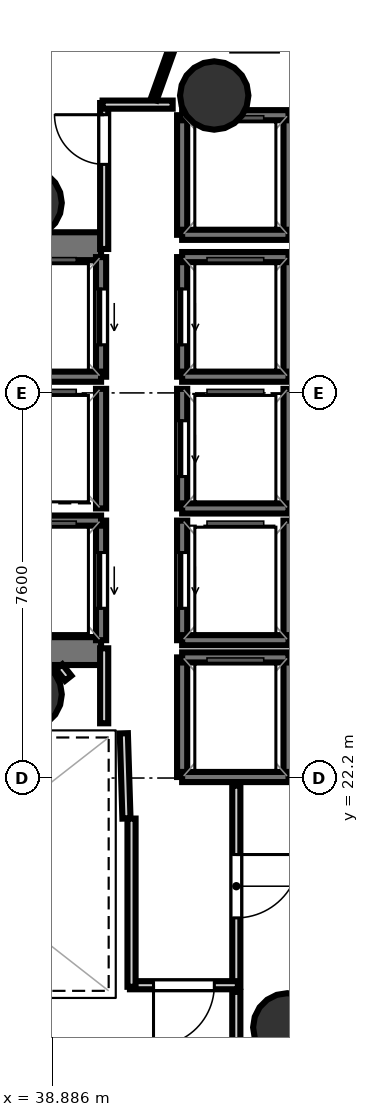
"""IFC4 building model, lengths in metres.
Left out: names, types, materials, properties, quantities, classifications, styles, units other than length and angle.
Written with IfcOpenShell. Run it as: python <this file> out.ifc"""

import sys

from ifc_helpers import new_model, si_unit, direction, frame, frame_2d, origin, origin_2d, place, context, subcontext, project, spatial, rectangle, hollow_circle, extrude, element, fill, save


model = new_model("IFC4")
c1 = context("Model", 3, precision=1e-05, world=origin(), true_north=direction((0.0, 1.0)))
c2 = subcontext(c1, "Body", "Model", "MODEL_VIEW")
j1 = project(units=[si_unit("LENGTHUNIT", "METRE"), si_unit("PLANEANGLEUNIT", "RADIAN")], contexts=[c1])
p1 = place(None, origin())
s1 = spatial("IfcSite", under=j1, at=p1, CompositionType="ELEMENT")
p2 = place(p1, origin())
s2 = spatial("IfcBuilding", under=s1, at=p2, CompositionType="ELEMENT")
p3 = place(p2, frame((0.0, 0.0, 151.3)))
s3 = spatial("IfcBuildingStorey", under=s2, at=p3, CompositionType="ELEMENT", Elevation=151.3)
p4 = place(p3, frame((29.23, 32.695, 0.0), z_axis=(0.0, 0.0, 1.0), x_axis=(1.0, 0.0, 0.0)))
e1 = element("IfcWall", 1, at=p4, inside=s3, PredefinedType="SHEAR", context=c2, shape_type="SweptSolid", body=[
    extrude(rectangle(XDim=10.62, YDim=0.55, at=frame_2d((5.31, 0.0))), origin(), (0.0, 0.0, 1.0), 3.52),
])
p5 = place(p4, frame((0.995, 0.0, 0.0)))
e2 = element("IfcOpeningElement", 2, at=p5, cuts=e1, PredefinedType="OPENING", context=c2, shape_type="SweptSolid", body=[
    extrude(rectangle(XDim=1.25, YDim=2.15, at=frame_2d((0.625, 1.075))), frame((0.0, 0.285, 0.0), z_axis=(0.0, -1.0, 0.0), x_axis=(1.0, 0.0, 0.0)), (0.0, 0.0, 1.0), 0.57),
])
p6 = place(p3, frame((29.23, 24.705, 0.0), z_axis=(0.0, 0.0, 1.0), x_axis=(1.0, 0.0, 0.0)))
e3 = element("IfcWall", 3, at=p6, inside=s3, PredefinedType="SHEAR", context=c2, shape_type="SweptSolid", body=[
    extrude(rectangle(XDim=10.62, YDim=0.55, at=frame_2d((5.31, 0.0))), origin(), (0.0, 0.0, 1.0), 3.52),
])
p7 = place(p6, frame((0.795, 0.0, 0.0)))
e4 = element("IfcOpeningElement", 4, at=p7, cuts=e3, PredefinedType="OPENING", context=c2, shape_type="SweptSolid", body=[
    extrude(rectangle(XDim=1.25, YDim=2.15, at=frame_2d((0.625, 1.075))), frame((0.0, 0.285, 0.0), z_axis=(0.0, -1.0, 0.0), x_axis=(1.0, 0.0, 0.0)), (0.0, 0.0, 1.0), 0.57),
])
for number, where, z_axis, x_axis in (
    (5, (38.4, 33.55, 0.0), (0.0, 0.0, 1.0), (1.0, 0.0, 0.0)),
    (6, (38.4, 23.85, 0.0), (0.0, 0.0, 1.0), (1.0, 0.0, 0.0)),
    (7, (42.083, 35.669, 0.0), (0.0, 0.0, 1.0), (1.0, 0.0, 0.0)),
    (8, (43.525, 17.279, 0.0), (0.0, 0.0, 1.0), (1.0, 0.0, 0.0)),
):
    element("IfcColumn", number, at=place(p3, frame(where, z_axis=z_axis, x_axis=x_axis)), inside=s3, PredefinedType="COLUMN", context=c2, shape_type="SweptSolid", body=[
        extrude(hollow_circle(Radius=0.675, WallThickness=0.032, at=origin_2d()), origin(), (0.0, 0.0, 1.0), 3.7),
    ])
p8 = place(p3, frame((39.85, 30.12, 0.0), z_axis=(0.0, 0.0, 1.0), x_axis=(0.0, 1.0, 0.0)))
e9 = element("IfcWall", 9, at=p8, inside=s3, PredefinedType="SOLIDWALL", context=c2, shape_type="SweptSolid", body=[
    extrude(rectangle(XDim=2.36, YDim=0.2, at=frame_2d((1.18, 0.0))), origin(), (0.0, 0.0, 1.0), 3.52),
])
p9 = place(p8, frame((0.63, 0.0, 0.0)))
e10 = element("IfcOpeningElement", 10, at=p9, cuts=e9, PredefinedType="OPENING", context=c2, shape_type="SweptSolid", body=[
    extrude(rectangle(XDim=1.1, YDim=2.15, at=frame_2d((0.55, 1.075))), frame((0.0, 0.11, 0.0), z_axis=(0.0, -1.0, 0.0), x_axis=(1.0, 0.0, 0.0)), (0.0, 0.0, 1.0), 0.22),
])
p10 = place(p3, frame((37.75, 30.12, 0.0), z_axis=(0.0, 0.0, 1.0), x_axis=(1.0, 0.0, 0.0)))
e11 = element("IfcWall", 11, at=p10, inside=s3, PredefinedType="SOLIDWALL", context=c2, shape_type="SweptSolid", body=[
    extrude(rectangle(XDim=2.1, YDim=0.2, at=frame_2d((1.05, 0.0))), origin(), (0.0, 0.0, 1.0), 3.52),
])
p11 = place(p3, frame((39.85, 24.92, 0.0), z_axis=(0.0, 0.0, 1.0), x_axis=(0.0, 1.0, 0.0)))
e12 = element("IfcWall", 12, at=p11, inside=s3, PredefinedType="SOLIDWALL", context=c2, shape_type="SweptSolid", body=[
    extrude(rectangle(XDim=2.36, YDim=0.2, at=frame_2d((1.18, 0.0))), origin(), (0.0, 0.0, 1.0), 3.52),
])
p12 = place(p11, frame((0.63, 0.0, 0.0)))
e13 = element("IfcOpeningElement", 13, at=p12, cuts=e12, PredefinedType="OPENING", context=c2, shape_type="SweptSolid", body=[
    extrude(rectangle(XDim=1.1, YDim=2.15, at=frame_2d((0.55, 1.075))), frame((0.0, 0.11, 0.0), z_axis=(0.0, -1.0, 0.0), x_axis=(1.0, 0.0, 0.0)), (0.0, 0.0, 1.0), 0.22),
])
p13 = place(p3, frame((37.75, 27.28, 0.0), z_axis=(0.0, 0.0, 1.0), x_axis=(1.0, 0.0, 0.0)))
e14 = element("IfcWall", 14, at=p13, inside=s3, PredefinedType="SOLIDWALL", context=c2, shape_type="SweptSolid", body=[
    extrude(rectangle(XDim=2.1, YDim=0.2, at=frame_2d((1.05, 0.0))), origin(), (0.0, 0.0, 1.0), 3.52),
])
p14 = place(p3, frame((43.55, 30.12, 0.0), z_axis=(0.0, 0.0, 1.0), x_axis=(0.0, 1.0, 0.0)))
e15 = element("IfcWall", 15, at=p14, inside=s3, PredefinedType="SOLIDWALL", context=c2, shape_type="SweptSolid", body=[
    extrude(rectangle(XDim=2.36, YDim=0.2, at=frame_2d((1.18, 0.0))), origin(), (0.0, 0.0, 1.0), 3.52),
])
p15 = place(p3, frame((41.45, 30.12, 0.0), z_axis=(0.0, 0.0, 1.0), x_axis=(0.0, 1.0, 0.0)))
e16 = element("IfcWall", 16, at=p15, inside=s3, PredefinedType="SOLIDWALL", context=c2, shape_type="SweptSolid", body=[
    extrude(rectangle(XDim=2.36, YDim=0.2, at=frame_2d((1.18, 0.0))), origin(), (0.0, 0.0, 1.0), 3.52),
])
p16 = place(p15, frame((0.63, 0.0, 0.0)))
e17 = element("IfcOpeningElement", 17, at=p16, cuts=e16, PredefinedType="OPENING", context=c2, shape_type="SweptSolid", body=[
    extrude(rectangle(XDim=1.1, YDim=2.15, at=frame_2d((0.55, 1.075))), frame((0.0, 0.11, 0.0), z_axis=(0.0, -1.0, 0.0), x_axis=(1.0, 0.0, 0.0)), (0.0, 0.0, 1.0), 0.22),
])
for number, where, z_axis, x_axis in (
    (18, (41.45, 32.48, 0.0), (0.0, 0.0, 1.0), (1.0, 0.0, 0.0)),
    (19, (41.45, 30.12, 0.0), (0.0, 0.0, 1.0), (1.0, 0.0, 0.0)),
):
    element("IfcWall", number, at=place(p3, frame(where, z_axis=z_axis, x_axis=x_axis)), inside=s3, PredefinedType="SOLIDWALL", context=c2, shape_type="SweptSolid", body=[
        extrude(rectangle(XDim=2.1, YDim=0.2, at=frame_2d((1.05, 0.0))), origin(), (0.0, 0.0, 1.0), 3.52),
    ])
p17 = place(p3, frame((43.55, 27.52, 0.0), z_axis=(0.0, 0.0, 1.0), x_axis=(0.0, 1.0, 0.0)))
e20 = element("IfcWall", 20, at=p17, inside=s3, PredefinedType="SOLIDWALL", context=c2, shape_type="SweptSolid", body=[
    extrude(rectangle(XDim=2.36, YDim=0.2, at=frame_2d((1.18, 0.0))), origin(), (0.0, 0.0, 1.0), 3.52),
])
p18 = place(p3, frame((41.45, 27.52, 0.0), z_axis=(0.0, 0.0, 1.0), x_axis=(0.0, 1.0, 0.0)))
e21 = element("IfcWall", 21, at=p18, inside=s3, PredefinedType="SOLIDWALL", context=c2, shape_type="SweptSolid", body=[
    extrude(rectangle(XDim=2.36, YDim=0.2, at=frame_2d((1.18, 0.0))), origin(), (0.0, 0.0, 1.0), 3.52),
])
p19 = place(p18, frame((0.63, 0.0, 0.0)))
e22 = element("IfcOpeningElement", 22, at=p19, cuts=e21, PredefinedType="OPENING", context=c2, shape_type="SweptSolid", body=[
    extrude(rectangle(XDim=1.1, YDim=2.15, at=frame_2d((0.55, 1.075))), frame((0.0, 0.11, 0.0), z_axis=(0.0, -1.0, 0.0), x_axis=(1.0, 0.0, 0.0)), (0.0, 0.0, 1.0), 0.22),
])
p20 = place(p3, frame((41.45, 27.52, 0.0), z_axis=(0.0, 0.0, 1.0), x_axis=(1.0, 0.0, 0.0)))
e23 = element("IfcWall", 23, at=p20, inside=s3, PredefinedType="SOLIDWALL", context=c2, shape_type="SweptSolid", body=[
    extrude(rectangle(XDim=2.1, YDim=0.2, at=frame_2d((1.05, 0.0))), origin(), (0.0, 0.0, 1.0), 3.52),
])
p21 = place(p3, frame((43.55, 24.92, 0.0), z_axis=(0.0, 0.0, 1.0), x_axis=(0.0, 1.0, 0.0)))
e24 = element("IfcWall", 24, at=p21, inside=s3, PredefinedType="SOLIDWALL", context=c2, shape_type="SweptSolid", body=[
    extrude(rectangle(XDim=2.36, YDim=0.2, at=frame_2d((1.18, 0.0))), origin(), (0.0, 0.0, 1.0), 3.52),
])
p22 = place(p3, frame((41.45, 24.92, 0.0), z_axis=(0.0, 0.0, 1.0), x_axis=(0.0, 1.0, 0.0)))
e25 = element("IfcWall", 25, at=p22, inside=s3, PredefinedType="SOLIDWALL", context=c2, shape_type="SweptSolid", body=[
    extrude(rectangle(XDim=2.36, YDim=0.2, at=frame_2d((1.18, 0.0))), origin(), (0.0, 0.0, 1.0), 3.52),
])
p23 = place(p22, frame((0.63, 0.0, 0.0)))
e26 = element("IfcOpeningElement", 26, at=p23, cuts=e25, PredefinedType="OPENING", context=c2, shape_type="SweptSolid", body=[
    extrude(rectangle(XDim=1.1, YDim=2.15, at=frame_2d((0.55, 1.075))), frame((0.0, 0.11, 0.0), z_axis=(0.0, -1.0, 0.0), x_axis=(1.0, 0.0, 0.0)), (0.0, 0.0, 1.0), 0.22),
])
p24 = place(p3, frame((41.45, 24.92, 0.0), z_axis=(0.0, 0.0, 1.0), x_axis=(1.0, 0.0, 0.0)))
e27 = element("IfcWall", 27, at=p24, inside=s3, PredefinedType="SOLIDWALL", context=c2, shape_type="SweptSolid", body=[
    extrude(rectangle(XDim=2.1, YDim=0.2, at=frame_2d((1.05, 0.0))), origin(), (0.0, 0.0, 1.0), 3.52),
])
p25 = place(p3, frame((39.85, 27.52, 0.0), z_axis=(0.0, 0.0, 1.0), x_axis=(0.0, 1.0, 0.0)))
e28 = element("IfcWall", 28, at=p25, inside=s3, PredefinedType="SOLIDWALL", context=c2, shape_type="SweptSolid", body=[
    extrude(rectangle(XDim=2.36, YDim=0.2, at=frame_2d((1.18, 0.0))), origin(), (0.0, 0.0, 1.0), 3.52),
])
for number, where, z_axis, x_axis in (
    (29, (43.55, 22.22, 0.0), (0.0, 0.0, 1.0), (0.0, 1.0, 0.0)),
    (30, (41.45, 22.22, 0.0), (0.0, 0.0, 1.0), (0.0, 1.0, 0.0)),
):
    element("IfcWall", number, at=place(p3, frame(where, z_axis=z_axis, x_axis=x_axis)), inside=s3, PredefinedType="SOLIDWALL", context=c2, shape_type="SweptSolid", body=[
        extrude(rectangle(XDim=2.36, YDim=0.2, at=frame_2d((1.18, 0.0))), origin(), (0.0, 0.0, 1.0), 3.52),
    ])
for number, where, z_axis, x_axis in (
    (31, (41.45, 24.58, 0.0), (0.0, 0.0, 1.0), (1.0, 0.0, 0.0)),
    (32, (41.45, 22.22, 0.0), (0.0, 0.0, 1.0), (1.0, 0.0, 0.0)),
):
    element("IfcWall", number, at=place(p3, frame(where, z_axis=z_axis, x_axis=x_axis)), inside=s3, PredefinedType="SOLIDWALL", context=c2, shape_type="SweptSolid", body=[
        extrude(rectangle(XDim=2.1, YDim=0.2, at=frame_2d((1.05, 0.0))), origin(), (0.0, 0.0, 1.0), 3.52),
    ])
for number, where, z_axis, x_axis in (
    (33, (43.55, 32.92, 0.0), (0.0, 0.0, 1.0), (0.0, 1.0, 0.0)),
    (34, (41.45, 32.92, 0.0), (0.0, 0.0, 1.0), (0.0, 1.0, 0.0)),
):
    element("IfcWall", number, at=place(p3, frame(where, z_axis=z_axis, x_axis=x_axis)), inside=s3, PredefinedType="SOLIDWALL", context=c2, shape_type="SweptSolid", body=[
        extrude(rectangle(XDim=2.36, YDim=0.2, at=frame_2d((1.18, 0.0))), origin(), (0.0, 0.0, 1.0), 3.52),
    ])
for number, where, z_axis, x_axis in (
    (35, (41.45, 35.28, 0.0), (0.0, 0.0, 1.0), (1.0, 0.0, 0.0)),
    (36, (41.45, 32.92, 0.0), (0.0, 0.0, 1.0), (1.0, 0.0, 0.0)),
):
    element("IfcWall", number, at=place(p3, frame(where, z_axis=z_axis, x_axis=x_axis)), inside=s3, PredefinedType="SOLIDWALL", context=c2, shape_type="SweptSolid", body=[
        extrude(rectangle(XDim=2.1, YDim=0.2, at=frame_2d((1.05, 0.0))), origin(), (0.0, 0.0, 1.0), 3.52),
    ])
p26 = place(p3, frame((40.351, 21.401, 0.0), z_axis=(0.0, 0.0, 1.0), x_axis=(-0.031058045979, 0.999517582527, 0.0)))
e37 = element("IfcWall", 37, at=p26, inside=s3, PredefinedType="PARTITIONING", context=c2, shape_type="SweptSolid", body=[
    extrude(rectangle(XDim=1.682, YDim=0.16, at=frame_2d((0.841, 0.0))), origin(), (0.0, 0.0, 1.0), 2.84),
])
p27 = place(p3, frame((39.911, 23.28, 0.0), z_axis=(0.0, 0.0, 1.0), x_axis=(0.0, 1.0, 0.0)))
e38 = element("IfcWall", 38, at=p27, inside=s3, PredefinedType="PARTITIONING", context=c2, shape_type="SweptSolid", body=[
    extrude(rectangle(XDim=1.48, YDim=0.16, at=frame_2d((0.74, 0.0))), origin(), (0.0, 0.0, 1.0), 2.84),
])
p28 = place(p3, frame((39.911, 32.64, 0.0), z_axis=(0.0, 0.0, 1.0), x_axis=(0.0, 1.0, 0.0)))
e39 = element("IfcWall", 39, at=p28, inside=s3, PredefinedType="PARTITIONING", context=c2, shape_type="SweptSolid", body=[
    extrude(rectangle(XDim=2.88, YDim=0.16, at=frame_2d((1.44, 0.0))), origin(), (0.0, 0.0, 1.0), 2.84),
])
p29 = place(p28, frame((1.67, 0.0, 0.0)))
e40 = element("IfcOpeningElement", 40, at=p29, cuts=e39, PredefinedType="OPENING", context=c2, shape_type="SweptSolid", body=[
    extrude(rectangle(XDim=0.98, YDim=2.1, at=frame_2d((0.49, 1.05))), frame((0.0, 0.09, 0.0), z_axis=(0.0, -1.0, 0.0), x_axis=(1.0, 0.0, 0.0)), (0.0, 0.0, 1.0), 0.18),
])
p30 = place(p3, frame((39.88, 35.489, 0.0), z_axis=(0.0, 0.0, 1.0), x_axis=(1.0, 0.0, 0.0)))
e41 = element("IfcWall", 41, at=p30, inside=s3, PredefinedType="PARTITIONING", context=c2, shape_type="SweptSolid", body=[
    extrude(rectangle(XDim=1.383, YDim=0.16, at=frame_2d((0.691, 0.0))), origin(), (0.0, 0.0, 1.0), 2.84),
])
p31 = place(p3, frame((42.519, 22.05, 0.0), z_axis=(0.0, 0.0, 1.0), x_axis=(0.0, -1.0, 0.0)))
e42 = element("IfcWall", 42, at=p31, inside=s3, PredefinedType="PARTITIONING", context=c2, shape_type="SweptSolid", body=[
    extrude(rectangle(XDim=3.97, YDim=0.16, at=frame_2d((1.985, 0.0))), origin(), (0.0, 0.0, 1.0), 2.84),
])
p32 = place(p31, frame((1.36, 0.0, 0.0)))
e43 = element("IfcOpeningElement", 43, at=p32, cuts=e42, PredefinedType="OPENING", context=c2, shape_type="SweptSolid", body=[
    extrude(rectangle(XDim=1.25, YDim=2.2, at=frame_2d((0.625, 1.1))), frame((0.0, 0.09, 0.0), z_axis=(0.0, -1.0, 0.0), x_axis=(1.0, 0.0, 0.0)), (0.0, 0.0, 1.0), 0.18),
])
p33 = place(p3, frame((42.55, 18.111, 0.0), z_axis=(0.0, 0.0, 1.0), x_axis=(-1.0, 0.0, 0.0)))
e44 = element("IfcWall", 44, at=p33, inside=s3, PredefinedType="PARTITIONING", context=c2, shape_type="SweptSolid", body=[
    extrude(rectangle(XDim=2.13, YDim=0.16, at=frame_2d((1.065, 0.0))), origin(), (0.0, 0.0, 1.0), 2.84),
])
p34 = place(p33, frame((0.465, 0.0, 0.0)))
e45 = element("IfcOpeningElement", 45, at=p34, cuts=e44, PredefinedType="OPENING", context=c2, shape_type="SweptSolid", body=[
    extrude(rectangle(XDim=1.2, YDim=2.15, at=frame_2d((0.6, 1.075))), frame((0.0, 0.09, 0.0), z_axis=(0.0, -1.0, 0.0), x_axis=(1.0, 0.0, 0.0)), (0.0, 0.0, 1.0), 0.18),
])
p35 = place(p3, frame((40.451, 18.08, 0.0), z_axis=(0.0, 0.0, 1.0), x_axis=(0.0, 1.0, 0.0)))
e46 = element("IfcWall", 46, at=p35, inside=s3, PredefinedType="PARTITIONING", context=c2, shape_type="SweptSolid", body=[
    extrude(rectangle(XDim=3.32, YDim=0.16, at=frame_2d((1.66, 0.0))), origin(), (0.0, 0.0, 1.0), 2.84),
])
p36 = place(p3, frame((39.202, 24.169, 0.0), z_axis=(0.0, 0.0, 1.0), x_axis=(-0.621699046284, 0.783256213413, 0.0)))
e47 = element("IfcWall", 47, at=p36, inside=s3, PredefinedType="PARTITIONING", context=c2, shape_type="SweptSolid", body=[
    extrude(rectangle(XDim=0.289, YDim=0.16, at=frame_2d((0.144, 0.0))), origin(), (0.0, 0.0, 1.0), 2.84),
])
p37 = place(p3, frame((42.519, 17.98, 0.0), z_axis=(0.0, 0.0, 1.0), x_axis=(0.0, -1.0, 0.0)))
e48 = element("IfcWall", 48, at=p37, inside=s3, PredefinedType="PARTITIONING", context=c2, shape_type="SweptSolid", body=[
    extrude(rectangle(XDim=3.243, YDim=0.16, at=frame_2d((1.621, 0.0))), origin(), (0.0, 0.0, 1.0), 2.84),
])
p38 = place(p3, frame((40.888, 35.59, 0.0), z_axis=(0.0, 0.0, 1.0), x_axis=(0.336053947572, 0.941842738636, 0.0)))
e49 = element("IfcWall", 49, at=p38, inside=s3, PredefinedType="PARTITIONING", context=c2, shape_type="SweptSolid", body=[
    extrude(rectangle(XDim=2.19, YDim=0.12, at=frame_2d((1.095, 0.0))), origin(), (0.0, 0.0, 1.0), 2.84),
])
p39 = place(p9, origin())
e50 = element("IfcDoor", 50, at=p39, inside=s3, OperationType="SLIDING_TO_LEFT", PredefinedType="DOOR", context=c2, shape_type="SweptSolid", body=[
    extrude(rectangle(XDim=1.1, YDim=2.15, at=frame_2d((0.55, 1.075))), frame((0.0, 0.025, 0.0), z_axis=(0.0, -1.0, 0.0), x_axis=(1.0, 0.0, 0.0)), (0.0, 0.0, 1.0), 0.05),
])
fill(e10, e50)
p40 = place(p12, origin())
e51 = element("IfcDoor", 51, at=p40, inside=s3, OperationType="SLIDING_TO_LEFT", PredefinedType="DOOR", context=c2, shape_type="SweptSolid", body=[
    extrude(rectangle(XDim=1.1, YDim=2.15, at=frame_2d((0.55, 1.075))), frame((0.0, 0.025, 0.0), z_axis=(0.0, -1.0, 0.0), x_axis=(1.0, 0.0, 0.0)), (0.0, 0.0, 1.0), 0.05),
])
fill(e13, e51)
p41 = place(p16, origin())
e52 = element("IfcDoor", 52, at=p41, inside=s3, OperationType="SLIDING_TO_LEFT", PredefinedType="DOOR", context=c2, shape_type="SweptSolid", body=[
    extrude(rectangle(XDim=1.1, YDim=2.15, at=frame_2d((0.55, 1.075))), frame((0.0, 0.025, 0.0), z_axis=(0.0, -1.0, 0.0), x_axis=(1.0, 0.0, 0.0)), (0.0, 0.0, 1.0), 0.05),
])
fill(e17, e52)
p42 = place(p19, origin())
e53 = element("IfcDoor", 53, at=p42, inside=s3, OperationType="SLIDING_TO_LEFT", PredefinedType="DOOR", context=c2, shape_type="SweptSolid", body=[
    extrude(rectangle(XDim=1.1, YDim=2.15, at=frame_2d((0.55, 1.075))), frame((0.0, 0.025, 0.0), z_axis=(0.0, -1.0, 0.0), x_axis=(1.0, 0.0, 0.0)), (0.0, 0.0, 1.0), 0.05),
])
fill(e22, e53)
p43 = place(p23, origin())
e54 = element("IfcDoor", 54, at=p43, inside=s3, OperationType="SLIDING_TO_LEFT", PredefinedType="DOOR", context=c2, shape_type="SweptSolid", body=[
    extrude(rectangle(XDim=1.1, YDim=2.15, at=frame_2d((0.55, 1.075))), frame((0.0, 0.025, 0.0), z_axis=(0.0, -1.0, 0.0), x_axis=(1.0, 0.0, 0.0)), (0.0, 0.0, 1.0), 0.05),
])
fill(e26, e54)
p44 = place(p34, origin())
e55 = element("IfcDoor", 55, at=p44, inside=s3, OperationType="SINGLE_SWING_RIGHT", PredefinedType="DOOR", context=c2, shape_type="SweptSolid", body=[
    extrude(rectangle(XDim=1.2, YDim=2.15, at=frame_2d((0.6, 1.075))), frame((0.0, 0.025, 0.0), z_axis=(0.0, -1.0, 0.0), x_axis=(1.0, 0.0, 0.0)), (0.0, 0.0, 1.0), 0.05),
])
fill(e45, e55)
p45 = place(p32, origin())
e56 = element("IfcDoor", 56, at=p45, inside=s3, OperationType="SINGLE_SWING_LEFT", PredefinedType="DOOR", context=c2, shape_type="SweptSolid", body=[
    extrude(rectangle(XDim=1.25, YDim=2.2, at=frame_2d((0.625, 1.1))), frame((0.0, 0.025, 0.0), z_axis=(0.0, -1.0, 0.0), x_axis=(1.0, 0.0, 0.0)), (0.0, 0.0, 1.0), 0.05),
])
fill(e43, e56)
p46 = place(p29, origin())
e57 = element("IfcDoor", 57, at=p46, inside=s3, OperationType="SINGLE_SWING_RIGHT", PredefinedType="DOOR", context=c2, shape_type="SweptSolid", body=[
    extrude(rectangle(XDim=0.98, YDim=2.1, at=frame_2d((0.49, 1.05))), frame((0.0, 0.025, 0.0), z_axis=(0.0, -1.0, 0.0), x_axis=(1.0, 0.0, 0.0)), (0.0, 0.0, 1.0), 0.05),
])
fill(e40, e57)
save(model, sys.argv[1])
